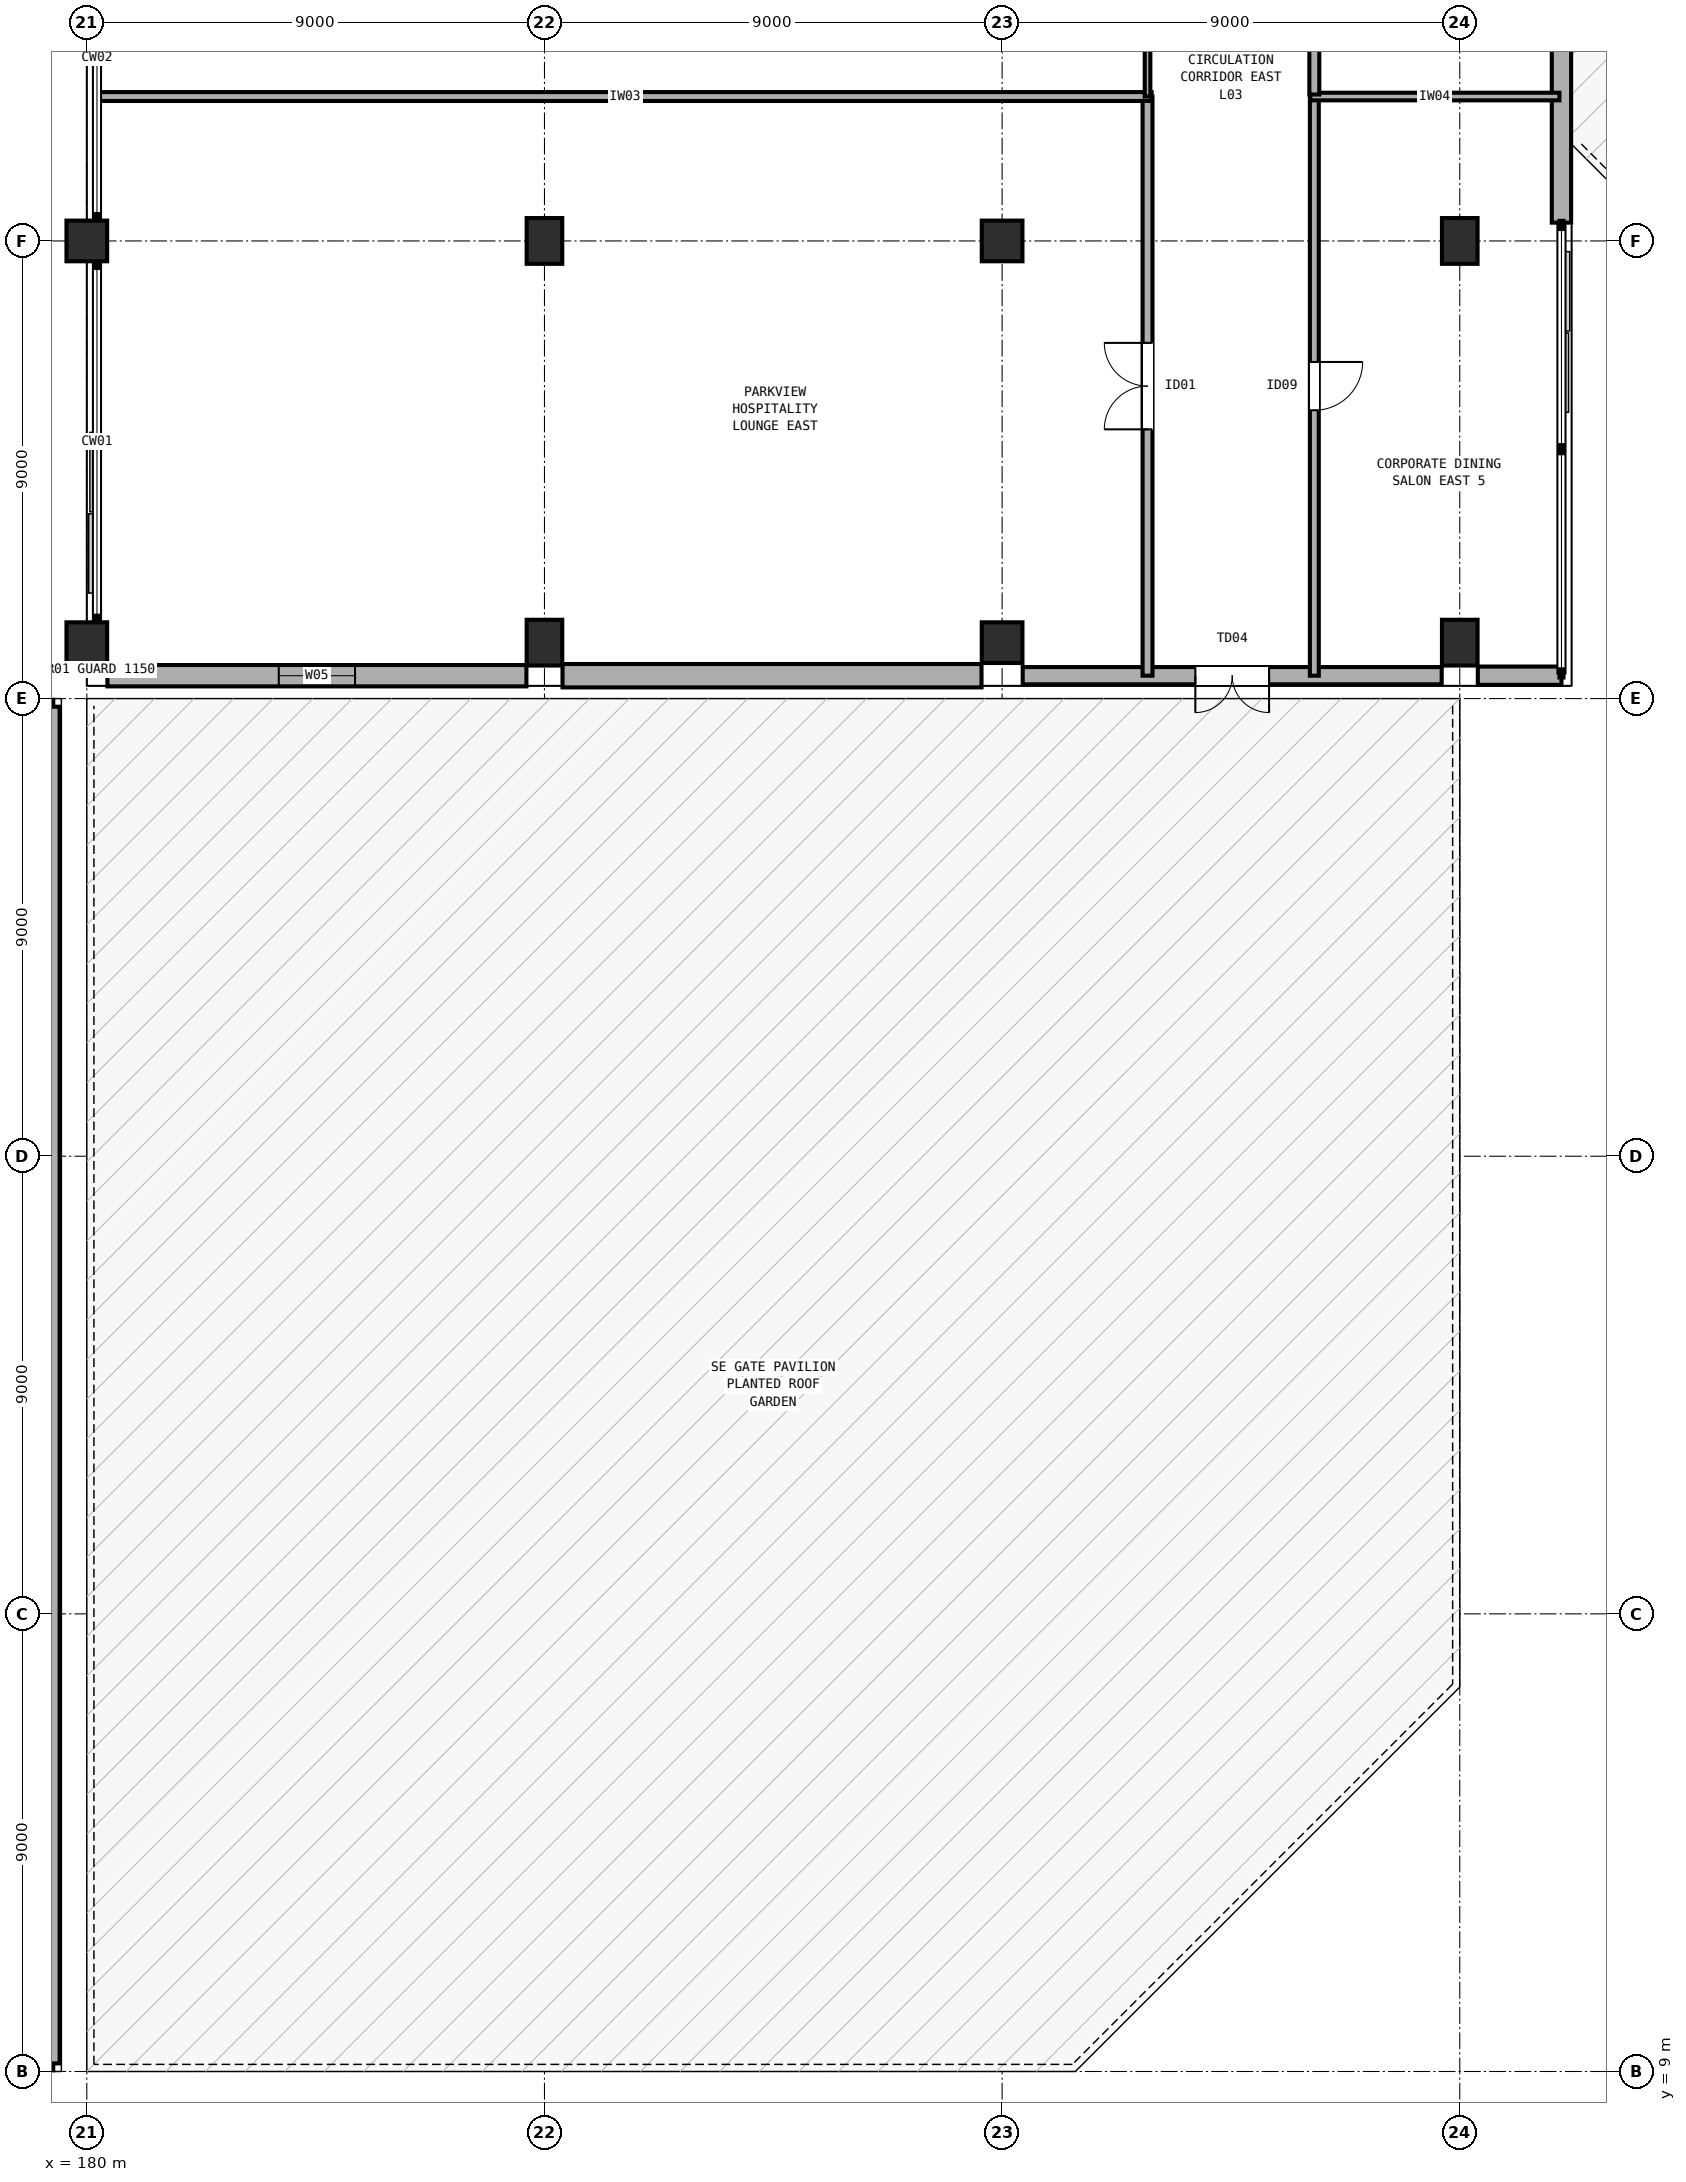
"""IFC4 building model, lengths in metres.
Left out: names, types, materials, properties, quantities, classifications, styles, units other than length and angle.
Written with IfcOpenShell. Run it as: python <this file> out.ifc"""

import sys

from ifc_helpers import new_model, si_unit, direction, frame, frame_2d, origin, origin_2d, place, context, subcontext, project, spatial, rectangle, extrude, element, fill, save


model = new_model("IFC4")
c1 = context("Model", 3, precision=1e-05, world=origin(), true_north=direction((0.0, 1.0)))
c2 = subcontext(c1, "Body", "Model", "MODEL_VIEW")
j1 = project(units=[si_unit("LENGTHUNIT", "METRE"), si_unit("PLANEANGLEUNIT", "RADIAN")], contexts=[c1])
p1 = place(None, origin())
s1 = spatial("IfcSite", under=j1, at=p1, CompositionType="ELEMENT")
p2 = place(p1, origin())
s2 = spatial("IfcBuilding", under=s1, at=p2, CompositionType="ELEMENT")
p3 = place(p2, frame((0.0, 0.0, 14.4)))
s3 = spatial("IfcBuildingStorey", under=s2, at=p3, CompositionType="ELEMENT", Elevation=14.4)
for number, where, z_axis, x_axis in (
    (1, (180.0, 37.1, 0.0), (0.0, 0.0, 1.0), (1.0, 0.0, 0.0)),
    (2, (180.0, 45.0, 0.0), (0.0, 0.0, 1.0), (1.0, 0.0, 0.0)),
):
    element("IfcColumn", number, at=place(p3, frame(where, z_axis=z_axis, x_axis=x_axis)), inside=s3, PredefinedType="COLUMN", context=c2, shape_type="SweptSolid", body=[
        extrude(rectangle(XDim=0.8, YDim=0.8, at=origin_2d()), origin(), (0.0, 0.0, 1.0), 4.8),
    ])
for number, where, z_axis, x_axis in (
    (3, (189.0, 37.1, 0.0), (0.0, 0.0, 1.0), (1.0, 0.0, 0.0)),
    (4, (189.0, 45.0, 0.0), (0.0, 0.0, 1.0), (1.0, 0.0, 0.0)),
):
    element("IfcColumn", number, at=place(p3, frame(where, z_axis=z_axis, x_axis=x_axis)), inside=s3, PredefinedType="COLUMN", context=c2, shape_type="SweptSolid", body=[
        extrude(rectangle(XDim=0.7, YDim=0.9, at=origin_2d()), origin(), (0.0, 0.0, 1.0), 4.8),
    ])
for number, where, z_axis, x_axis in (
    (5, (198.0, 37.1, 0.0), (0.0, 0.0, 1.0), (1.0, 0.0, 0.0)),
    (6, (198.0, 45.0, 0.0), (0.0, 0.0, 1.0), (1.0, 0.0, 0.0)),
):
    element("IfcColumn", number, at=place(p3, frame(where, z_axis=z_axis, x_axis=x_axis)), inside=s3, PredefinedType="COLUMN", context=c2, shape_type="SweptSolid", body=[
        extrude(rectangle(XDim=0.8, YDim=0.8, at=origin_2d()), origin(), (0.0, 0.0, 1.0), 4.8),
    ])
for number, where, z_axis, x_axis in (
    (7, (207.0, 37.1, 0.0), (0.0, 0.0, 1.0), (1.0, 0.0, 0.0)),
    (8, (207.0, 45.0, 0.0), (0.0, 0.0, 1.0), (1.0, 0.0, 0.0)),
):
    element("IfcColumn", number, at=place(p3, frame(where, z_axis=z_axis, x_axis=x_axis)), inside=s3, PredefinedType="COLUMN", context=c2, shape_type="SweptSolid", body=[
        extrude(rectangle(XDim=0.7, YDim=0.9, at=origin_2d()), origin(), (0.0, 0.0, 1.0), 4.8),
    ])
p4 = place(p3, frame((209.0, 54.27, 0.0), z_axis=(0.0, 0.0, 1.0), x_axis=(0.0, -1.0, 0.0)))
e9 = element("IfcWall", 9, at=p4, inside=s3, PredefinedType="SOLIDWALL", context=c2, shape_type="SweptSolid", body=[
    extrude(rectangle(XDim=8.91, YDim=0.38, at=frame_2d((4.455, 0.0))), origin(), (0.0, 0.0, 1.0), 3.58),
])
p5 = place(p3, frame((209.0, 36.45, 0.0), z_axis=(0.0, 0.0, 1.0), x_axis=(-1.0, 0.0, 0.0)))
e10 = element("IfcWall", 10, at=p5, inside=s3, PredefinedType="SOLIDWALL", context=c2, shape_type="SweptSolid", body=[
    extrude(rectangle(XDim=1.645, YDim=0.36, at=frame_2d((0.823, 0.0))), origin(), (0.0, 0.0, 1.0), 3.58),
])
p6 = place(p3, frame((206.645, 36.45, 0.0), z_axis=(0.0, 0.0, 1.0), x_axis=(-1.0, 0.0, 0.0)))
e11 = element("IfcWall", 11, at=p6, inside=s3, PredefinedType="SOLIDWALL", context=c2, shape_type="SweptSolid", body=[
    extrude(rectangle(XDim=8.24, YDim=0.34, at=frame_2d((4.12, 0.0))), origin(), (0.0, 0.0, 1.0), 3.58),
])
p7 = place(p6, frame((3.395, 0.0, 0.0)))
e12 = element("IfcOpeningElement", 12, at=p7, cuts=e11, PredefinedType="OPENING", context=c2, shape_type="SweptSolid", body=[
    extrude(rectangle(XDim=1.45, YDim=2.15, at=frame_2d((0.725, 1.075))), frame((0.0, 0.18, 0.0), z_axis=(0.0, -1.0, 0.0), x_axis=(1.0, 0.0, 0.0)), (0.0, 0.0, 1.0), 0.36),
])
p8 = place(p3, frame((197.595, 36.45, 0.0), z_axis=(0.0, 0.0, 1.0), x_axis=(-1.0, 0.0, 0.0)))
e13 = element("IfcWall", 13, at=p8, inside=s3, PredefinedType="SOLIDWALL", context=c2, shape_type="SweptSolid", body=[
    extrude(rectangle(XDim=8.24, YDim=0.46, at=frame_2d((4.12, 0.0))), origin(), (0.0, 0.0, 1.0), 3.58),
])
p9 = place(p3, frame((188.645, 36.45, 0.0), z_axis=(0.0, 0.0, 1.0), x_axis=(-1.0, 0.0, 0.0)))
e14 = element("IfcWall", 14, at=p9, inside=s3, PredefinedType="SOLIDWALL", context=c2, shape_type="SweptSolid", body=[
    extrude(rectangle(XDim=8.24, YDim=0.42, at=frame_2d((4.12, 0.0))), origin(), (0.0, 0.0, 1.0), 3.58),
])
p10 = place(p9, frame((3.37, 0.0, 0.9)))
e15 = element("IfcOpeningElement", 15, at=p10, cuts=e14, PredefinedType="OPENING", context=c2, shape_type="SweptSolid", body=[
    extrude(rectangle(XDim=1.5, YDim=1.6, at=frame_2d((0.75, 0.8))), frame((0.0, 0.22, 0.0), z_axis=(0.0, -1.0, 0.0), x_axis=(1.0, 0.0, 0.0)), (0.0, 0.0, 1.0), 0.44),
])
for number, where, z_axis, x_axis in (
    (16, (179.34, 9.16, 0.0), (0.0, 0.0, 1.0), (-1.0, 0.0, 0.0)),
    (17, (162.16, 35.84, 0.0), (0.0, 0.0, 1.0), (1.0, 0.0, 0.0)),
):
    element("IfcWall", number, at=place(p3, frame(where, z_axis=z_axis, x_axis=x_axis)), inside=s3, PredefinedType="PARAPET", context=c2, shape_type="SweptSolid", body=[
        extrude(rectangle(XDim=17.18, YDim=0.27, at=frame_2d((8.59, 0.0))), origin(), (0.0, 0.0, 1.0), 0.65),
    ])
p11 = place(p3, frame((179.34, 35.84, 0.0), z_axis=(0.0, 0.0, 1.0), x_axis=(0.0, -1.0, 0.0)))
e18 = element("IfcWall", 18, at=p11, inside=s3, PredefinedType="PARAPET", context=c2, shape_type="SweptSolid", body=[
    extrude(rectangle(XDim=26.68, YDim=0.25, at=frame_2d((13.34, 0.0))), origin(), (0.0, 0.0, 1.0), 0.65),
])
p12 = place(p3, frame((200.86, 36.45, 0.0), z_axis=(0.0, 0.0, 1.0), x_axis=(0.0, 1.0, 0.0)))
e19 = element("IfcWall", 19, at=p12, inside=s3, PredefinedType="PARTITIONING", context=c2, shape_type="SweptSolid", body=[
    extrude(rectangle(XDim=11.39, YDim=0.195, at=frame_2d((5.695, 0.0))), origin(), (0.0, 0.0, 1.0), 3.56),
])
p13 = place(p12, frame((4.845, 0.0, 0.0)))
e20 = element("IfcOpeningElement", 20, at=p13, cuts=e19, PredefinedType="OPENING", context=c2, shape_type="SweptSolid", body=[
    extrude(rectangle(XDim=1.7, YDim=2.2, at=frame_2d((0.85, 1.1))), frame((0.0, 0.107, 0.0), z_axis=(0.0, -1.0, 0.0), x_axis=(1.0, 0.0, 0.0)), (0.0, 0.0, 1.0), 0.215),
])
p14 = place(p3, frame((180.233, 47.84, 0.0), z_axis=(0.0, 0.0, 1.0), x_axis=(1.0, 0.0, 0.0)))
e21 = element("IfcWall", 21, at=p14, inside=s3, PredefinedType="PARTITIONING", context=c2, shape_type="SweptSolid", body=[
    extrude(rectangle(XDim=20.707, YDim=0.175, at=frame_2d((10.354, 0.0))), origin(), (0.0, 0.0, 1.0), 3.56),
])
p15 = place(p3, frame((200.86, 47.84, 0.0), z_axis=(0.0, 0.0, 1.0), x_axis=(0.0, 1.0, 0.0)))
e22 = element("IfcWall", 22, at=p15, inside=s3, PredefinedType="PARTITIONING", context=c2, shape_type="SweptSolid", body=[
    extrude(rectangle(XDim=11.39, YDim=0.11, at=frame_2d((5.695, 0.0))), origin(), (0.0, 0.0, 1.0), 3.56),
])
p16 = place(p15, frame((5.22, 0.0, 0.0)))
e23 = element("IfcOpeningElement", 23, at=p16, cuts=e22, PredefinedType="OPENING", context=c2, shape_type="SweptSolid", body=[
    extrude(rectangle(XDim=0.95, YDim=2.18, at=frame_2d((0.475, 1.09))), frame((0.0, 0.065, 0.0), z_axis=(0.0, -1.0, 0.0), x_axis=(1.0, 0.0, 0.0)), (0.0, 0.0, 1.0), 0.13),
])
p17 = place(p3, frame((204.14, 47.84, 0.0), z_axis=(0.0, 0.0, 1.0), x_axis=(0.0, -1.0, 0.0)))
e24 = element("IfcWall", 24, at=p17, inside=s3, PredefinedType="PARTITIONING", context=c2, shape_type="SweptSolid", body=[
    extrude(rectangle(XDim=11.39, YDim=0.175, at=frame_2d((5.695, 0.0))), origin(), (0.0, 0.0, 1.0), 3.56),
])
p18 = place(p17, frame((5.22, 0.0, 0.0)))
e25 = element("IfcOpeningElement", 25, at=p18, cuts=e24, PredefinedType="OPENING", context=c2, shape_type="SweptSolid", body=[
    extrude(rectangle(XDim=0.95, YDim=2.1, at=frame_2d((0.475, 1.05))), frame((0.0, 0.097, 0.0), z_axis=(0.0, -1.0, 0.0), x_axis=(1.0, 0.0, 0.0)), (0.0, 0.0, 1.0), 0.195),
])
p19 = place(p3, frame((204.06, 47.84, 0.0), z_axis=(0.0, 0.0, 1.0), x_axis=(1.0, 0.0, 0.0)))
e26 = element("IfcWall", 26, at=p19, inside=s3, PredefinedType="PARTITIONING", context=c2, shape_type="SweptSolid", body=[
    extrude(rectangle(XDim=4.9, YDim=0.15, at=frame_2d((2.45, 0.0))), origin(), (0.0, 0.0, 1.0), 3.56),
])
p20 = place(p3, frame((204.14, 47.88, 0.0), z_axis=(0.0, 0.0, 1.0), x_axis=(0.0, 1.0, 0.0)))
e27 = element("IfcWall", 27, at=p20, inside=s3, PredefinedType="PARTITIONING", context=c2, shape_type="SweptSolid", body=[
    extrude(rectangle(XDim=11.31, YDim=0.195, at=frame_2d((5.655, 0.0))), origin(), (0.0, 0.0, 1.0), 3.56),
])
p21 = place(p10, origin())
e28 = element("IfcWindow", 28, at=p21, inside=s3, PartitioningType="SINGLE_PANEL", PredefinedType="WINDOW", context=c2, shape_type="SweptSolid", body=[
    extrude(rectangle(XDim=1.5, YDim=1.6, at=frame_2d((0.75, 0.8))), frame((0.0, 0.03, 0.0), z_axis=(0.0, -1.0, 0.0), x_axis=(1.0, 0.0, 0.0)), (0.0, 0.0, 1.0), 0.06),
])
fill(e15, e28)
p22 = place(p7, origin())
e29 = element("IfcDoor", 29, at=p22, inside=s3, OperationType="DOUBLE_DOOR_SINGLE_SWING", PredefinedType="DOOR", context=c2, shape_type="SweptSolid", body=[
    extrude(rectangle(XDim=1.45, YDim=2.15, at=frame_2d((0.725, 1.075))), frame((0.0, 0.025, 0.0), z_axis=(0.0, -1.0, 0.0), x_axis=(1.0, 0.0, 0.0)), (0.0, 0.0, 1.0), 0.05),
])
fill(e12, e29)
p23 = place(p13, origin())
e30 = element("IfcDoor", 30, at=p23, inside=s3, OperationType="DOUBLE_DOOR_SINGLE_SWING", PredefinedType="DOOR", context=c2, shape_type="SweptSolid", body=[
    extrude(rectangle(XDim=1.7, YDim=2.2, at=frame_2d((0.85, 1.1))), frame((0.0, 0.025, 0.0), z_axis=(0.0, -1.0, 0.0), x_axis=(1.0, 0.0, 0.0)), (0.0, 0.0, 1.0), 0.05),
])
fill(e20, e30)
p24 = place(p18, origin())
e31 = element("IfcDoor", 31, at=p24, inside=s3, OperationType="SINGLE_SWING_LEFT", PredefinedType="DOOR", context=c2, shape_type="SweptSolid", body=[
    extrude(rectangle(XDim=0.95, YDim=2.1, at=frame_2d((0.475, 1.05))), frame((0.0, 0.025, 0.0), z_axis=(0.0, -1.0, 0.0), x_axis=(1.0, 0.0, 0.0)), (0.0, 0.0, 1.0), 0.05),
])
fill(e25, e31)
save(model, sys.argv[1])
